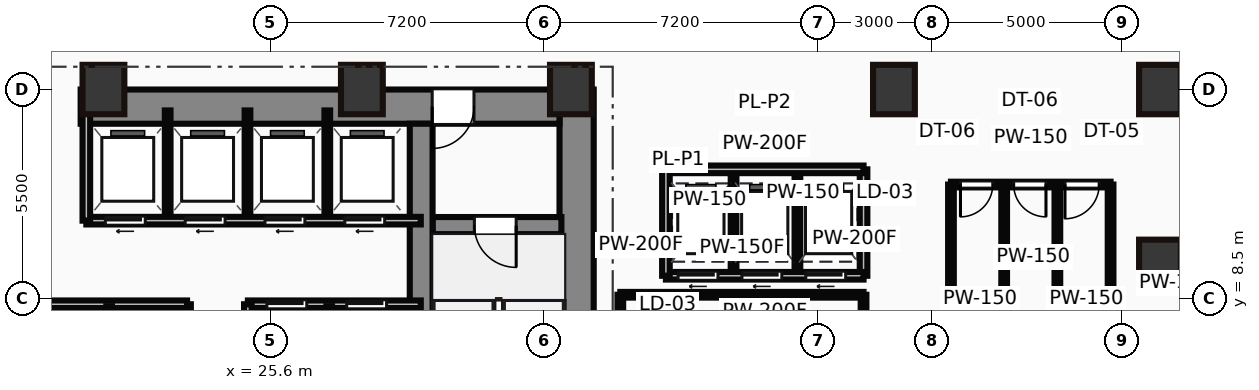
"""IFC4 building model, lengths in metres.
Left out: names, types, materials, properties, quantities, classifications, styles, units other than length and angle.
Written with IfcOpenShell. Run it as: python <this file> out.ifc"""

import sys

from ifc_helpers import new_model, si_unit, direction, frame, frame_2d, origin, origin_2d, place, context, subcontext, project, spatial, rectangle, hollow_rectangle, extrude, source, transform, mapped, element, fill, save


model = new_model("IFC4")
c1 = context("Model", 3, precision=1e-05, world=origin(), true_north=direction((0.0, 1.0)))
c2 = subcontext(c1, "Body", "Model", "MODEL_VIEW")
j1 = project(units=[si_unit("LENGTHUNIT", "METRE"), si_unit("PLANEANGLEUNIT", "RADIAN")], contexts=[c1])
p1 = place(None, origin())
s1 = spatial("IfcSite", under=j1, at=p1, CompositionType="ELEMENT")
p2 = place(p1, origin())
s2 = spatial("IfcBuilding", under=s1, at=p2, CompositionType="ELEMENT")
p3 = place(p2, origin())
s3 = spatial("IfcBuildingStorey", under=s2, at=p3, CompositionType="ELEMENT", Elevation=0.0)
m1 = source(origin(), c2, "Body", "SweptSolid", [
    extrude(rectangle(XDim=13.1, YDim=0.9, at=frame_2d((6.55, 0.0))), origin(), (0.0, 0.0, 1.0), 6.0),
])
p4 = place(p3, frame((33.65, 0.9, 0.0), z_axis=(0.0, 0.0, 1.0), x_axis=(0.0, 1.0, 0.0)))
e1 = element("IfcWall", 1, at=p4, inside=s3, PredefinedType="SHEAR", context=c2, shape_type="MappedRepresentation", body=[
    mapped(m1, transform((0.0, 0.0, 0.0))),
])
m2 = source(origin(), c2, "Body", "SweptSolid", [
    extrude(rectangle(XDim=12.6, YDim=0.9, at=frame_2d((6.3, 0.0))), origin(), (0.0, 0.0, 1.0), 6.0),
])
p5 = place(p3, frame((20.6, 13.55, 0.0), z_axis=(0.0, 0.0, 1.0), x_axis=(1.0, 0.0, 0.0)))
e2 = element("IfcWall", 2, at=p5, inside=s3, PredefinedType="SHEAR", context=c2, shape_type="MappedRepresentation", body=[
    mapped(m2, transform((0.0, 0.0, 0.0))),
])
p6 = place(p5, frame((9.25, 0.0, 0.0)))
e3 = element("IfcOpeningElement", 3, at=p6, cuts=e2, PredefinedType="OPENING", context=c2, shape_type="SweptSolid", body=[
    extrude(rectangle(XDim=1.1, YDim=2.15, at=frame_2d((0.55, 1.075))), frame((0.0, 0.46, 0.0), z_axis=(0.0, -1.0, 0.0), x_axis=(1.0, 0.0, 0.0)), (0.0, 0.0, 1.0), 0.92),
])
m3 = source(origin(), c2, "Body", "SweptSolid", [
    extrude(rectangle(XDim=12.2, YDim=0.6, at=frame_2d((6.1, 0.0))), origin(), (0.0, 0.0, 1.0), 6.0),
])
p7 = place(p3, frame((29.56, 0.9, 0.0), z_axis=(0.0, 0.0, 1.0), x_axis=(0.0, 1.0, 0.0)))
e4 = element("IfcWall", 4, at=p7, inside=s3, PredefinedType="SHEAR", context=c2, shape_type="MappedRepresentation", body=[
    mapped(m3, transform((0.0, 0.0, 0.0))),
])
m4 = source(origin(), c2, "Body", "SweptSolid", [
    extrude(rectangle(XDim=3.39, YDim=0.45, at=frame_2d((1.695, 0.0))), origin(), (0.0, 0.0, 1.0), 6.0),
])
p8 = place(p3, frame((29.86, 10.42, 0.0), z_axis=(0.0, 0.0, 1.0), x_axis=(1.0, 0.0, 0.0)))
e5 = element("IfcWall", 5, at=p8, inside=s3, PredefinedType="SHEAR", context=c2, shape_type="MappedRepresentation", body=[
    mapped(m4, transform((0.0, 0.0, 0.0))),
])
p9 = place(p8, frame((1.1, 0.0, 0.0)))
e6 = element("IfcOpeningElement", 6, at=p9, cuts=e5, PredefinedType="OPENING", context=c2, shape_type="SweptSolid", body=[
    extrude(rectangle(XDim=1.1, YDim=2.15, at=frame_2d((0.55, 1.075))), frame((0.0, 0.235, 0.0), z_axis=(0.0, -1.0, 0.0), x_axis=(1.0, 0.0, 0.0)), (0.0, 0.0, 1.0), 0.47),
])
m5 = source(origin(), c2, "Body", "SweptSolid", [
    extrude(hollow_rectangle(XDim=1.1, YDim=1.3, WallThickness=0.055, at=origin_2d()), origin(), (0.0, 0.0, 1.0), 6.0),
])
for number, where, z_axis, x_axis in (
    (7, (21.2, 14.0, 0.0), (0.0, 0.0, 1.0), (1.0, 0.0, 0.0)),
    (8, (28.0, 14.0, 0.0), (0.0, 0.0, 1.0), (1.0, 0.0, 0.0)),
    (9, (33.5, 14.0, 0.0), (0.0, 0.0, 1.0), (1.0, 0.0, 0.0)),
    (10, (42.0, 14.0, 0.0), (0.0, 0.0, 1.0), (1.0, 0.0, 0.0)),
    (11, (49.0, 14.0, 0.0), (0.0, 0.0, 1.0), (1.0, 0.0, 0.0)),
):
    element("IfcColumn", number, at=place(p3, frame(where, z_axis=z_axis, x_axis=x_axis)), inside=s3, PredefinedType="PILASTER", context=c2, shape_type="MappedRepresentation", body=[
        mapped(m5, transform((0.0, 0.0, 0.0))),
    ])
m6 = source(origin(), c2, "Body", "SweptSolid", [
    extrude(hollow_rectangle(XDim=1.1, YDim=1.1, WallThickness=0.05, at=origin_2d()), origin(), (0.0, 0.0, 1.0), 6.0),
])
p10 = place(p3, frame((49.0, 9.5, 0.0), z_axis=(0.0, 0.0, 1.0), x_axis=(1.0, 0.0, 0.0)))
e12 = element("IfcColumn", 12, at=p10, inside=s3, PredefinedType="PILASTER", context=c2, shape_type="MappedRepresentation", body=[
    mapped(m6, transform((0.0, 0.0, 0.0))),
])
m7 = source(origin(), c2, "Body", "SweptSolid", [
    extrude(rectangle(XDim=11.85, YDim=0.2, at=frame_2d((5.925, 0.0))), origin(), (0.0, 0.0, 1.0), 5.7),
])
p11 = place(p3, frame((11.55, 8.35, 0.0), z_axis=(0.0, 0.0, 1.0), x_axis=(1.0, 0.0, 0.0)))
e13 = element("IfcWall", 13, at=p11, inside=s3, PredefinedType="PARTITIONING", context=c2, shape_type="MappedRepresentation", body=[
    mapped(m7, transform((0.0, 0.0, 0.0))),
])
m8 = source(origin(), c2, "Body", "SweptSolid", [
    extrude(rectangle(XDim=2.6, YDim=0.2, at=frame_2d((1.3, 0.0))), origin(), (0.0, 0.0, 1.0), 5.7),
])
p12 = place(p3, frame((23.4, 5.75, 0.0), z_axis=(0.0, 0.0, 1.0), x_axis=(0.0, 1.0, 0.0)))
e14 = element("IfcWall", 14, at=p12, inside=s3, PredefinedType="PARTITIONING", context=c2, shape_type="MappedRepresentation", body=[
    mapped(m8, transform((0.0, 0.0, 0.0))),
])
m9 = source(origin(), c2, "Body", "SweptSolid", [
    extrude(rectangle(XDim=2.5, YDim=0.15, at=frame_2d((1.25, 0.0))), origin(), (0.0, 0.0, 1.0), 5.7),
])
p13 = place(p3, frame((21.35, 5.8, 0.0), z_axis=(0.0, 0.0, 1.0), x_axis=(0.0, 1.0, 0.0)))
e15 = element("IfcWall", 15, at=p13, inside=s3, PredefinedType="PARTITIONING", context=c2, shape_type="MappedRepresentation", body=[
    mapped(m9, transform((0.0, 0.0, 0.0))),
])
m10 = source(origin(), c2, "Body", "SweptSolid", [
    extrude(rectangle(XDim=8.8, YDim=0.2, at=frame_2d((4.4, 0.0))), origin(), (0.0, 0.0, 1.0), 5.7),
])
p14 = place(p3, frame((20.75, 10.55, 0.0), z_axis=(0.0, 0.0, 1.0), x_axis=(1.0, 0.0, 0.0)))
e16 = element("IfcWall", 16, at=p14, inside=s3, PredefinedType="PARTITIONING", context=c2, shape_type="MappedRepresentation", body=[
    mapped(m10, transform((0.0, 0.0, 0.0))),
])
p15 = place(p14, frame((0.5, 0.0, 0.0)))
e17 = element("IfcOpeningElement", 17, at=p15, cuts=e16, PredefinedType="OPENING", context=c2, shape_type="SweptSolid", body=[
    extrude(rectangle(XDim=1.05, YDim=2.15, at=frame_2d((0.525, 1.075))), frame((0.0, 0.11, 0.0), z_axis=(0.0, -1.0, 0.0), x_axis=(1.0, 0.0, 0.0)), (0.0, 0.0, 1.0), 0.22),
])
p16 = place(p14, frame((2.6, 0.0, 0.0)))
e18 = element("IfcOpeningElement", 18, at=p16, cuts=e16, PredefinedType="OPENING", context=c2, shape_type="SweptSolid", body=[
    extrude(rectangle(XDim=1.05, YDim=2.15, at=frame_2d((0.525, 1.075))), frame((0.0, 0.11, 0.0), z_axis=(0.0, -1.0, 0.0), x_axis=(1.0, 0.0, 0.0)), (0.0, 0.0, 1.0), 0.22),
])
p17 = place(p14, frame((4.7, 0.0, 0.0)))
e19 = element("IfcOpeningElement", 19, at=p17, cuts=e16, PredefinedType="OPENING", context=c2, shape_type="SweptSolid", body=[
    extrude(rectangle(XDim=1.05, YDim=2.15, at=frame_2d((0.525, 1.075))), frame((0.0, 0.11, 0.0), z_axis=(0.0, -1.0, 0.0), x_axis=(1.0, 0.0, 0.0)), (0.0, 0.0, 1.0), 0.22),
])
p18 = place(p14, frame((6.8, 0.0, 0.0)))
e20 = element("IfcOpeningElement", 20, at=p18, cuts=e16, PredefinedType="OPENING", context=c2, shape_type="SweptSolid", body=[
    extrude(rectangle(XDim=1.05, YDim=2.15, at=frame_2d((0.525, 1.075))), frame((0.0, 0.11, 0.0), z_axis=(0.0, -1.0, 0.0), x_axis=(1.0, 0.0, 0.0)), (0.0, 0.0, 1.0), 0.22),
])
m11 = source(origin(), c2, "Body", "SweptSolid", [
    extrude(rectangle(XDim=3.0, YDim=0.2, at=frame_2d((1.5, 0.0))), origin(), (0.0, 0.0, 1.0), 5.7),
])
p19 = place(p3, frame((20.75, 10.55, 0.0), z_axis=(0.0, 0.0, 1.0), x_axis=(0.0, 1.0, 0.0)))
e21 = element("IfcWall", 21, at=p19, inside=s3, PredefinedType="PARTITIONING", context=c2, shape_type="MappedRepresentation", body=[
    mapped(m11, transform((0.0, 0.0, 0.0))),
])
m12 = source(origin(), c2, "Body", "SweptSolid", [
    extrude(rectangle(XDim=2.85, YDim=0.15, at=frame_2d((1.425, 0.0))), origin(), (0.0, 0.0, 1.0), 5.7),
])
for number, where, z_axis, x_axis in (
    (22, (22.89, 10.6, 0.0), (0.0, 0.0, 1.0), (0.0, 1.0, 0.0)),
    (23, (24.99, 10.6, 0.0), (0.0, 0.0, 1.0), (0.0, 1.0, 0.0)),
    (24, (27.09, 10.6, 0.0), (0.0, 0.0, 1.0), (0.0, 1.0, 0.0)),
):
    element("IfcWall", number, at=place(p3, frame(where, z_axis=z_axis, x_axis=x_axis)), inside=s3, PredefinedType="PARTITIONING", context=c2, shape_type="MappedRepresentation", body=[
        mapped(m12, transform((0.0, 0.0, 0.0))),
    ])
m13 = source(origin(), c2, "Body", "SweptSolid", [
    extrude(rectangle(XDim=4.55, YDim=0.2, at=frame_2d((2.275, 0.0))), origin(), (0.0, 0.0, 1.0), 5.7),
])
p20 = place(p3, frame((25.0, 8.35, 0.0), z_axis=(0.0, 0.0, 1.0), x_axis=(1.0, 0.0, 0.0)))
e25 = element("IfcWall", 25, at=p20, inside=s3, PredefinedType="PARTITIONING", context=c2, shape_type="MappedRepresentation", body=[
    mapped(m13, transform((0.0, 0.0, 0.0))),
])
p21 = place(p20, frame((0.5, 0.0, 0.0)))
e26 = element("IfcOpeningElement", 26, at=p21, cuts=e25, PredefinedType="OPENING", context=c2, shape_type="SweptSolid", body=[
    extrude(rectangle(XDim=1.05, YDim=2.15, at=frame_2d((0.525, 1.075))), frame((0.0, 0.11, 0.0), z_axis=(0.0, -1.0, 0.0), x_axis=(1.0, 0.0, 0.0)), (0.0, 0.0, 1.0), 0.22),
])
p22 = place(p20, frame((2.6, 0.0, 0.0)))
e27 = element("IfcOpeningElement", 27, at=p22, cuts=e25, PredefinedType="OPENING", context=c2, shape_type="SweptSolid", body=[
    extrude(rectangle(XDim=1.05, YDim=2.15, at=frame_2d((0.525, 1.075))), frame((0.0, 0.11, 0.0), z_axis=(0.0, -1.0, 0.0), x_axis=(1.0, 0.0, 0.0)), (0.0, 0.0, 1.0), 0.22),
])
p23 = place(p3, frame((25.0, 5.75, 0.0), z_axis=(0.0, 0.0, 1.0), x_axis=(0.0, 1.0, 0.0)))
e28 = element("IfcWall", 28, at=p23, inside=s3, PredefinedType="PARTITIONING", context=c2, shape_type="MappedRepresentation", body=[
    mapped(m8, transform((0.0, 0.0, 0.0))),
])
p24 = place(p3, frame((27.14, 5.8, 0.0), z_axis=(0.0, 0.0, 1.0), x_axis=(0.0, 1.0, 0.0)))
e29 = element("IfcWall", 29, at=p24, inside=s3, PredefinedType="PARTITIONING", context=c2, shape_type="MappedRepresentation", body=[
    mapped(m9, transform((0.0, 0.0, 0.0))),
])
m14 = source(origin(), c2, "Body", "SweptSolid", [
    extrude(rectangle(XDim=5.2, YDim=0.2, at=frame_2d((2.6, 0.0))), origin(), (0.0, 0.0, 1.0), 5.7),
])
p25 = place(p3, frame((36.0, 9.1, 0.0), z_axis=(0.0, 0.0, 1.0), x_axis=(1.0, 0.0, 0.0)))
e30 = element("IfcWall", 30, at=p25, inside=s3, PredefinedType="PARTITIONING", context=c2, shape_type="MappedRepresentation", body=[
    mapped(m14, transform((0.0, 0.0, 0.0))),
])
p26 = place(p25, frame((0.32, 0.0, 0.0)))
e31 = element("IfcOpeningElement", 31, at=p26, cuts=e30, PredefinedType="OPENING", context=c2, shape_type="SweptSolid", body=[
    extrude(rectangle(XDim=1.05, YDim=2.15, at=frame_2d((0.525, 1.075))), frame((0.0, 0.11, 0.0), z_axis=(0.0, -1.0, 0.0), x_axis=(1.0, 0.0, 0.0)), (0.0, 0.0, 1.0), 0.22),
])
p27 = place(p25, frame((2.0, 0.0, 0.0)))
e32 = element("IfcOpeningElement", 32, at=p27, cuts=e30, PredefinedType="OPENING", context=c2, shape_type="SweptSolid", body=[
    extrude(rectangle(XDim=1.05, YDim=2.15, at=frame_2d((0.525, 1.075))), frame((0.0, 0.11, 0.0), z_axis=(0.0, -1.0, 0.0), x_axis=(1.0, 0.0, 0.0)), (0.0, 0.0, 1.0), 0.22),
])
p28 = place(p25, frame((3.68, 0.0, 0.0)))
e33 = element("IfcOpeningElement", 33, at=p28, cuts=e30, PredefinedType="OPENING", context=c2, shape_type="SweptSolid", body=[
    extrude(rectangle(XDim=1.05, YDim=2.15, at=frame_2d((0.525, 1.075))), frame((0.0, 0.11, 0.0), z_axis=(0.0, -1.0, 0.0), x_axis=(1.0, 0.0, 0.0)), (0.0, 0.0, 1.0), 0.22),
])
p29 = place(p3, frame((36.0, 11.9, 0.0), z_axis=(0.0, 0.0, 1.0), x_axis=(1.0, 0.0, 0.0)))
e34 = element("IfcWall", 34, at=p29, inside=s3, PredefinedType="PARTITIONING", context=c2, shape_type="MappedRepresentation", body=[
    mapped(m14, transform((0.0, 0.0, 0.0))),
])
m15 = source(origin(), c2, "Body", "SweptSolid", [
    extrude(rectangle(XDim=2.8, YDim=0.2, at=frame_2d((1.4, 0.0))), origin(), (0.0, 0.0, 1.0), 5.7),
])
for number, where, z_axis, x_axis in (
    (35, (36.0, 9.1, 0.0), (0.0, 0.0, 1.0), (0.0, 1.0, 0.0)),
    (36, (41.2, 9.1, 0.0), (0.0, 0.0, 1.0), (0.0, 1.0, 0.0)),
):
    element("IfcWall", number, at=place(p3, frame(where, z_axis=z_axis, x_axis=x_axis)), inside=s3, PredefinedType="PARTITIONING", context=c2, shape_type="MappedRepresentation", body=[
        mapped(m15, transform((0.0, 0.0, 0.0))),
    ])
m16 = source(origin(), c2, "Body", "SweptSolid", [
    extrude(rectangle(XDim=2.7, YDim=0.15, at=frame_2d((1.35, 0.0))), origin(), (0.0, 0.0, 1.0), 5.7),
])
for number, where, z_axis, x_axis in (
    (37, (37.78, 9.15, 0.0), (0.0, 0.0, 1.0), (0.0, 1.0, 0.0)),
    (38, (39.46, 9.15, 0.0), (0.0, 0.0, 1.0), (0.0, 1.0, 0.0)),
):
    element("IfcWall", number, at=place(p3, frame(where, z_axis=z_axis, x_axis=x_axis)), inside=s3, PredefinedType="PARTITIONING", context=c2, shape_type="MappedRepresentation", body=[
        mapped(m16, transform((0.0, 0.0, 0.0))),
    ])
m17 = source(origin(), c2, "Body", "SweptSolid", [
    extrude(rectangle(XDim=4.2, YDim=0.15, at=frame_2d((2.1, 0.0))), origin(), (0.0, 0.0, 1.0), 5.7),
])
p30 = place(p3, frame((43.5, 11.5, 0.0), z_axis=(0.0, 0.0, 1.0), x_axis=(1.0, 0.0, 0.0)))
e39 = element("IfcWall", 39, at=p30, inside=s3, PredefinedType="PARTITIONING", context=c2, shape_type="MappedRepresentation", body=[
    mapped(m17, transform((0.0, 0.0, 0.0))),
])
p31 = place(p30, frame((0.25, 0.0, 0.0)))
e40 = element("IfcOpeningElement", 40, at=p31, cuts=e39, PredefinedType="OPENING", context=c2, shape_type="SweptSolid", body=[
    extrude(rectangle(XDim=0.85, YDim=2.1, at=frame_2d((0.425, 1.05))), frame((0.0, 0.085, 0.0), z_axis=(0.0, -1.0, 0.0), x_axis=(1.0, 0.0, 0.0)), (0.0, 0.0, 1.0), 0.17),
])
p32 = place(p30, frame((1.65, 0.0, 0.0)))
e41 = element("IfcOpeningElement", 41, at=p32, cuts=e39, PredefinedType="OPENING", context=c2, shape_type="SweptSolid", body=[
    extrude(rectangle(XDim=0.85, YDim=2.1, at=frame_2d((0.425, 1.05))), frame((0.0, 0.085, 0.0), z_axis=(0.0, -1.0, 0.0), x_axis=(1.0, 0.0, 0.0)), (0.0, 0.0, 1.0), 0.17),
])
p33 = place(p30, frame((3.0, 0.0, 0.0)))
e42 = element("IfcOpeningElement", 42, at=p33, cuts=e39, PredefinedType="OPENING", context=c2, shape_type="SweptSolid", body=[
    extrude(rectangle(XDim=0.9, YDim=2.1, at=frame_2d((0.45, 1.05))), frame((0.0, 0.085, 0.0), z_axis=(0.0, -1.0, 0.0), x_axis=(1.0, 0.0, 0.0)), (0.0, 0.0, 1.0), 0.17),
])
m18 = source(origin(), c2, "Body", "SweptSolid", [
    extrude(rectangle(XDim=6.0, YDim=0.15, at=frame_2d((3.0, 0.0))), origin(), (0.0, 0.0, 1.0), 5.7),
])
for number, where, z_axis, x_axis in (
    (43, (43.5, 5.5, 0.0), (0.0, 0.0, 1.0), (0.0, 1.0, 0.0)),
    (44, (47.7, 5.5, 0.0), (0.0, 0.0, 1.0), (0.0, 1.0, 0.0)),
    (45, (44.9, 5.5, 0.0), (0.0, 0.0, 1.0), (0.0, 1.0, 0.0)),
    (46, (46.3, 5.5, 0.0), (0.0, 0.0, 1.0), (0.0, 1.0, 0.0)),
):
    element("IfcWall", number, at=place(p3, frame(where, z_axis=z_axis, x_axis=x_axis)), inside=s3, PredefinedType="PARTITIONING", context=c2, shape_type="MappedRepresentation", body=[
        mapped(m18, transform((0.0, 0.0, 0.0))),
    ])
m19 = source(origin(), c2, "Body", "SweptSolid", [
    extrude(rectangle(XDim=6.4, YDim=0.15, at=frame_2d((3.2, 0.0))), origin(), (0.0, 0.0, 1.0), 5.7),
])
p34 = place(p3, frame((34.8, 8.6, 0.0), z_axis=(0.0, 0.0, 1.0), x_axis=(1.0, 0.0, 0.0)))
e47 = element("IfcWall", 47, at=p34, inside=s3, PredefinedType="PARTITIONING", context=c2, shape_type="MappedRepresentation", body=[
    mapped(m19, transform((0.0, 0.0, 0.0))),
])
m20 = source(origin(), c2, "Body", "SweptSolid", [
    extrude(rectangle(XDim=3.8, YDim=0.15, at=frame_2d((1.9, 0.0))), origin(), (0.0, 0.0, 1.0), 5.7),
])
for number, where, z_axis, x_axis in (
    (48, (34.8, 4.8, 0.0), (0.0, 0.0, 1.0), (0.0, 1.0, 0.0)),
    (49, (41.2, 4.8, 0.0), (0.0, 0.0, 1.0), (0.0, 1.0, 0.0)),
):
    element("IfcWall", number, at=place(p3, frame(where, z_axis=z_axis, x_axis=x_axis)), inside=s3, PredefinedType="PARTITIONING", context=c2, shape_type="MappedRepresentation", body=[
        mapped(m20, transform((0.0, 0.0, 0.0))),
    ])
m21 = source(origin(), c2, "Body", "SweptSolid", [
    extrude(rectangle(XDim=1.1, YDim=2.15, at=frame_2d((0.55, 1.075))), frame((0.0, 0.025, 0.0), z_axis=(0.0, -1.0, 0.0), x_axis=(1.0, 0.0, 0.0)), (0.0, 0.0, 1.0), 0.05),
])
p35 = place(p9, frame((1.1, 0.0, 0.0), z_axis=(0.0, 0.0, 1.0), x_axis=(-1.0, 0.0, 0.0)))
e50 = element("IfcDoor", 50, at=p35, inside=s3, OperationType="SINGLE_SWING_RIGHT", PredefinedType="DOOR", context=c2, shape_type="MappedRepresentation", body=[
    mapped(m21, transform((0.0, 0.0, 0.0))),
])
fill(e6, e50)
p36 = place(p6, origin())
e51 = element("IfcDoor", 51, at=p36, inside=s3, OperationType="SINGLE_SWING_LEFT", PredefinedType="DOOR", context=c2, shape_type="MappedRepresentation", body=[
    mapped(m21, transform((0.0, 0.0, 0.0))),
])
fill(e3, e51)
m22 = source(origin(), c2, "Body", "SweptSolid", [
    extrude(rectangle(XDim=1.05, YDim=2.15, at=frame_2d((0.525, 1.075))), frame((0.0, 0.025, 0.0), z_axis=(0.0, -1.0, 0.0), x_axis=(1.0, 0.0, 0.0)), (0.0, 0.0, 1.0), 0.05),
])
p37 = place(p15, frame((1.05, 0.0, 0.0), z_axis=(0.0, 0.0, 1.0), x_axis=(-1.0, 0.0, 0.0)))
e52 = element("IfcDoor", 52, at=p37, inside=s3, OperationType="SLIDING_TO_LEFT", PredefinedType="DOOR", context=c2, shape_type="MappedRepresentation", body=[
    mapped(m22, transform((0.0, 0.0, 0.0))),
])
fill(e17, e52)
p38 = place(p16, frame((1.05, 0.0, 0.0), z_axis=(0.0, 0.0, 1.0), x_axis=(-1.0, 0.0, 0.0)))
e53 = element("IfcDoor", 53, at=p38, inside=s3, OperationType="SLIDING_TO_LEFT", PredefinedType="DOOR", context=c2, shape_type="MappedRepresentation", body=[
    mapped(m22, transform((0.0, 0.0, 0.0))),
])
fill(e18, e53)
p39 = place(p17, frame((1.05, 0.0, 0.0), z_axis=(0.0, 0.0, 1.0), x_axis=(-1.0, 0.0, 0.0)))
e54 = element("IfcDoor", 54, at=p39, inside=s3, OperationType="SLIDING_TO_LEFT", PredefinedType="DOOR", context=c2, shape_type="MappedRepresentation", body=[
    mapped(m22, transform((0.0, 0.0, 0.0))),
])
fill(e19, e54)
p40 = place(p18, frame((1.05, 0.0, 0.0), z_axis=(0.0, 0.0, 1.0), x_axis=(-1.0, 0.0, 0.0)))
e55 = element("IfcDoor", 55, at=p40, inside=s3, OperationType="SLIDING_TO_LEFT", PredefinedType="DOOR", context=c2, shape_type="MappedRepresentation", body=[
    mapped(m22, transform((0.0, 0.0, 0.0))),
])
fill(e20, e55)
p41 = place(p21, origin())
e56 = element("IfcDoor", 56, at=p41, inside=s3, OperationType="SLIDING_TO_LEFT", PredefinedType="DOOR", context=c2, shape_type="MappedRepresentation", body=[
    mapped(m22, transform((0.0, 0.0, 0.0))),
])
fill(e26, e56)
p42 = place(p22, origin())
e57 = element("IfcDoor", 57, at=p42, inside=s3, OperationType="SLIDING_TO_LEFT", PredefinedType="DOOR", context=c2, shape_type="MappedRepresentation", body=[
    mapped(m22, transform((0.0, 0.0, 0.0))),
])
fill(e27, e57)
p43 = place(p26, frame((1.05, 0.0, 0.0), z_axis=(0.0, 0.0, 1.0), x_axis=(-1.0, 0.0, 0.0)))
e58 = element("IfcDoor", 58, at=p43, inside=s3, OperationType="SLIDING_TO_LEFT", PredefinedType="DOOR", context=c2, shape_type="MappedRepresentation", body=[
    mapped(m22, transform((0.0, 0.0, 0.0))),
])
fill(e31, e58)
p44 = place(p27, frame((1.05, 0.0, 0.0), z_axis=(0.0, 0.0, 1.0), x_axis=(-1.0, 0.0, 0.0)))
e59 = element("IfcDoor", 59, at=p44, inside=s3, OperationType="SLIDING_TO_LEFT", PredefinedType="DOOR", context=c2, shape_type="MappedRepresentation", body=[
    mapped(m22, transform((0.0, 0.0, 0.0))),
])
fill(e32, e59)
p45 = place(p28, frame((1.05, 0.0, 0.0), z_axis=(0.0, 0.0, 1.0), x_axis=(-1.0, 0.0, 0.0)))
e60 = element("IfcDoor", 60, at=p45, inside=s3, OperationType="SLIDING_TO_LEFT", PredefinedType="DOOR", context=c2, shape_type="MappedRepresentation", body=[
    mapped(m22, transform((0.0, 0.0, 0.0))),
])
fill(e33, e60)
m23 = source(origin(), c2, "Body", "SweptSolid", [
    extrude(rectangle(XDim=0.85, YDim=2.1, at=frame_2d((0.425, 1.05))), frame((0.0, 0.025, 0.0), z_axis=(0.0, -1.0, 0.0), x_axis=(1.0, 0.0, 0.0)), (0.0, 0.0, 1.0), 0.05),
])
p46 = place(p31, frame((0.85, 0.0, 0.0), z_axis=(0.0, 0.0, 1.0), x_axis=(-1.0, 0.0, 0.0)))
e61 = element("IfcDoor", 61, at=p46, inside=s3, OperationType="SINGLE_SWING_LEFT", PredefinedType="DOOR", context=c2, shape_type="MappedRepresentation", body=[
    mapped(m23, transform((0.0, 0.0, 0.0))),
])
fill(e40, e61)
p47 = place(p32, frame((0.85, 0.0, 0.0), z_axis=(0.0, 0.0, 1.0), x_axis=(-1.0, 0.0, 0.0)))
e62 = element("IfcDoor", 62, at=p47, inside=s3, OperationType="SINGLE_SWING_RIGHT", PredefinedType="DOOR", context=c2, shape_type="MappedRepresentation", body=[
    mapped(m23, transform((0.0, 0.0, 0.0))),
])
fill(e41, e62)
m24 = source(origin(), c2, "Body", "SweptSolid", [
    extrude(rectangle(XDim=0.9, YDim=2.1, at=frame_2d((0.45, 1.05))), frame((0.0, 0.025, 0.0), z_axis=(0.0, -1.0, 0.0), x_axis=(1.0, 0.0, 0.0)), (0.0, 0.0, 1.0), 0.05),
])
p48 = place(p33, frame((0.9, 0.0, 0.0), z_axis=(0.0, 0.0, 1.0), x_axis=(-1.0, 0.0, 0.0)))
e63 = element("IfcDoor", 63, at=p48, inside=s3, OperationType="SINGLE_SWING_LEFT", PredefinedType="DOOR", context=c2, shape_type="MappedRepresentation", body=[
    mapped(m24, transform((0.0, 0.0, 0.0))),
])
fill(e42, e63)
save(model, sys.argv[1])
